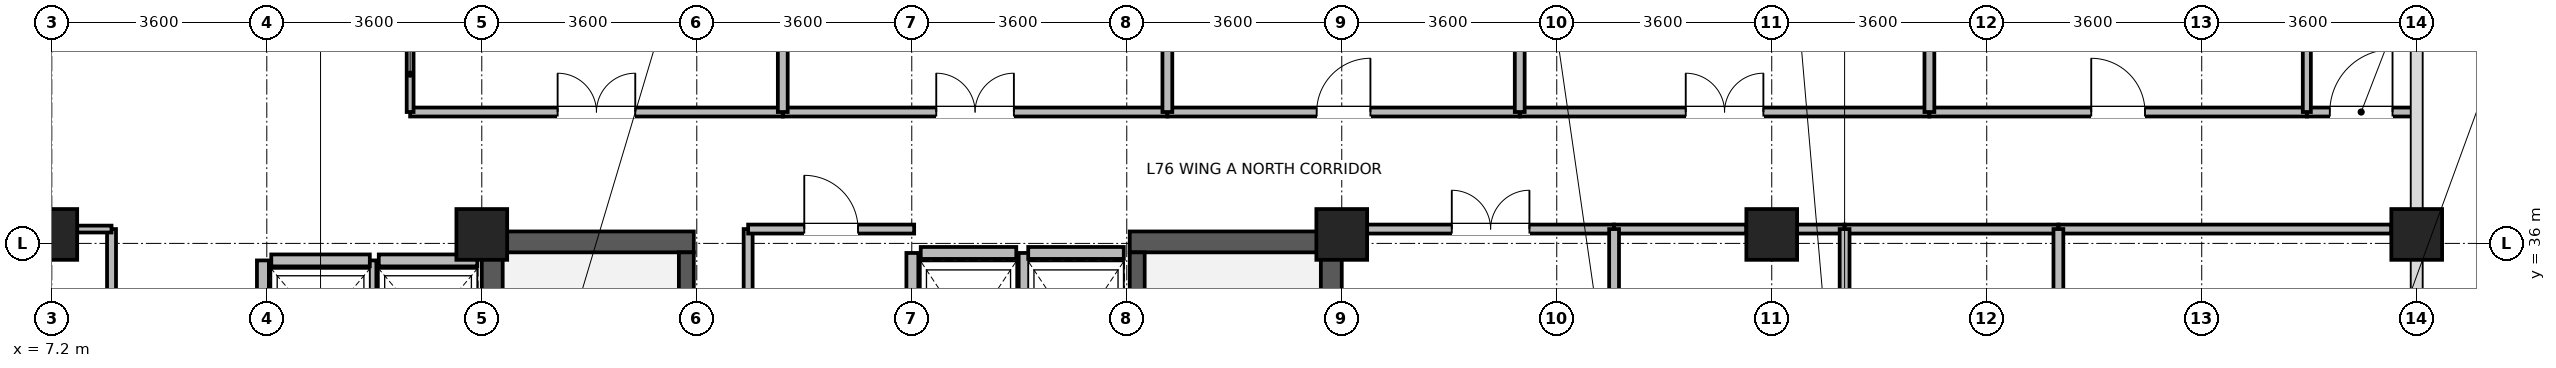
"""IFC4 building model, lengths in metres.
Left out: names, types, materials, properties, quantities, classifications, styles, units other than length and angle.
Written with IfcOpenShell. Run it as: python <this file> out.ifc"""

import sys

from ifc_helpers import new_model, si_unit, direction, frame, frame_2d, origin, origin_2d, place, context, subcontext, project, spatial, rectangle, extrude, source, transform, mapped, element, fill, save


model = new_model("IFC4")
c1 = context("Model", 3, precision=1e-05, world=origin(), true_north=direction((0.0, 1.0)))
c2 = subcontext(c1, "Body", "Model", "MODEL_VIEW")
j1 = project(units=[si_unit("LENGTHUNIT", "METRE"), si_unit("PLANEANGLEUNIT", "RADIAN")], contexts=[c1])
p1 = place(None, origin())
s1 = spatial("IfcSite", under=j1, at=p1, CompositionType="ELEMENT")
p2 = place(p1, origin())
s2 = spatial("IfcBuilding", under=s1, at=p2, CompositionType="ELEMENT")
p3 = place(p2, frame((0.0, 0.0, 294.3)))
s3 = spatial("IfcBuildingStorey", under=s2, at=p3, CompositionType="ELEMENT", Elevation=294.3)
for number, where, z_axis, x_axis in (
    (1, (14.575, 28.5, 0.0), (0.0, 0.0, 1.0), (0.0, 1.0, 0.0)),
    (2, (28.625, 28.5, 0.0), (0.0, 0.0, 1.0), (0.0, 1.0, 0.0)),
):
    element("IfcWall", number, at=place(p3, frame(where, z_axis=z_axis, x_axis=x_axis)), inside=s3, PredefinedType="SHEAR", context=c2, shape_type="SweptSolid", body=[
        extrude(rectangle(XDim=7.7, YDim=0.35, at=frame_2d((3.85, 0.0))), origin(), (0.0, 0.0, 1.0), 3.4),
    ])
for number, where, z_axis, x_axis in (
    (3, (14.75, 36.025, 0.0), (0.0, 0.0, 1.0), (1.0, 0.0, 0.0)),
    (4, (25.25, 36.025, 0.0), (0.0, 0.0, 1.0), (1.0, 0.0, 0.0)),
):
    element("IfcWall", number, at=place(p3, frame(where, z_axis=z_axis, x_axis=x_axis)), inside=s3, PredefinedType="SHEAR", context=c2, shape_type="SweptSolid", body=[
        extrude(rectangle(XDim=3.2, YDim=0.35, at=frame_2d((1.6, 0.0))), origin(), (0.0, 0.0, 1.0), 3.4),
    ])
p4 = place(p3, frame((17.825, 28.85, 0.0), z_axis=(0.0, 0.0, 1.0), x_axis=(0.0, 1.0, 0.0)))
e5 = element("IfcWall", 5, at=p4, inside=s3, PredefinedType="SHEAR", context=c2, shape_type="SweptSolid", body=[
    extrude(rectangle(XDim=7.0, YDim=0.25, at=frame_2d((3.5, 0.0))), origin(), (0.0, 0.0, 1.0), 3.4),
])
p5 = place(p4, frame((0.15, 0.0, 0.0)))
e6 = element("IfcOpeningElement", 6, at=p5, cuts=e5, PredefinedType="OPENING", context=c2, shape_type="SweptSolid", body=[
    extrude(rectangle(XDim=1.1, YDim=2.08, at=frame_2d((0.55, 1.04))), frame((0.0, 0.135, 0.0), z_axis=(0.0, -1.0, 0.0), x_axis=(1.0, 0.0, 0.0)), (0.0, 0.0, 1.0), 0.27),
])
p6 = place(p3, frame((25.375, 28.85, 0.0), z_axis=(0.0, 0.0, 1.0), x_axis=(0.0, 1.0, 0.0)))
e7 = element("IfcWall", 7, at=p6, inside=s3, PredefinedType="SHEAR", context=c2, shape_type="SweptSolid", body=[
    extrude(rectangle(XDim=7.0, YDim=0.25, at=frame_2d((3.5, 0.0))), origin(), (0.0, 0.0, 1.0), 3.4),
])
p7 = place(p6, frame((0.15, 0.0, 0.0)))
e8 = element("IfcOpeningElement", 8, at=p7, cuts=e7, PredefinedType="OPENING", context=c2, shape_type="SweptSolid", body=[
    extrude(rectangle(XDim=1.1, YDim=2.08, at=frame_2d((0.55, 1.04))), frame((0.0, 0.135, 0.0), z_axis=(0.0, -1.0, 0.0), x_axis=(1.0, 0.0, 0.0)), (0.0, 0.0, 1.0), 0.27),
])
m1 = source(origin(), c2, "Body", "SweptSolid", [
    extrude(rectangle(XDim=0.85, YDim=0.85, at=origin_2d()), origin(), (0.0, 0.0, 1.0), 3.7),
])
for number, where, z_axis, x_axis in (
    (9, (7.2, 36.15, 0.0), (0.0, 0.0, 1.0), (1.0, 0.0, 0.0)),
    (10, (14.4, 36.15, 0.0), (0.0, 0.0, 1.0), (1.0, 0.0, 0.0)),
    (11, (28.8, 36.15, 0.0), (0.0, 0.0, 1.0), (1.0, 0.0, 0.0)),
    (12, (36.0, 36.15, 0.0), (0.0, 0.0, 1.0), (1.0, 0.0, 0.0)),
    (13, (46.8, 36.15, 0.0), (0.0, 0.0, 1.0), (1.0, 0.0, 0.0)),
):
    element("IfcColumn", number, at=place(p3, frame(where, z_axis=z_axis, x_axis=x_axis)), inside=s3, PredefinedType="COLUMN", context=c2, shape_type="MappedRepresentation", body=[
        mapped(m1, transform((0.0, 0.0, 0.0), x_axis=(1.0, 0.0, 0.0), y_axis=(0.0, 1.0, 0.0), z_axis=(0.0, 0.0, 1.0), scale=1.0)),
    ])
p8 = place(p3, frame((12.675, 35.715, 0.0), z_axis=(0.0, 0.0, 1.0), x_axis=(1.0, 0.0, 0.0)))
e14 = element("IfcWall", 14, at=p8, inside=s3, PredefinedType="PARTITIONING", context=c2, shape_type="SweptSolid", body=[
    extrude(rectangle(XDim=1.65, YDim=0.2, at=frame_2d((0.825, 0.0))), origin(), (0.0, 0.0, 1.0), 3.38),
])
p9 = place(p3, frame((12.535, 33.485, 0.0), z_axis=(0.0, 0.0, 1.0), x_axis=(0.0, 1.0, 0.0)))
e15 = element("IfcWall", 15, at=p9, inside=s3, PredefinedType="PARTITIONING", context=c2, shape_type="SweptSolid", body=[
    extrude(rectangle(XDim=2.23, YDim=0.2, at=frame_2d((1.115, 0.0))), origin(), (0.0, 0.0, 1.0), 3.38),
])
p10 = place(p3, frame((10.875, 35.715, 0.0), z_axis=(0.0, 0.0, 1.0), x_axis=(1.0, 0.0, 0.0)))
e16 = element("IfcWall", 16, at=p10, inside=s3, PredefinedType="PARTITIONING", context=c2, shape_type="SweptSolid", body=[
    extrude(rectangle(XDim=1.65, YDim=0.2, at=frame_2d((0.825, 0.0))), origin(), (0.0, 0.0, 1.0), 3.38),
])
p11 = place(p3, frame((10.735, 33.485, 0.0), z_axis=(0.0, 0.0, 1.0), x_axis=(0.0, 1.0, 0.0)))
e17 = element("IfcWall", 17, at=p11, inside=s3, PredefinedType="PARTITIONING", context=c2, shape_type="SweptSolid", body=[
    extrude(rectangle(XDim=2.23, YDim=0.2, at=frame_2d((1.115, 0.0))), origin(), (0.0, 0.0, 1.0), 3.38),
])
p12 = place(p3, frame((21.75, 35.84, 0.0), z_axis=(0.0, 0.0, 1.0), x_axis=(1.0, 0.0, 0.0)))
e18 = element("IfcWall", 18, at=p12, inside=s3, PredefinedType="PARTITIONING", context=c2, shape_type="SweptSolid", body=[
    extrude(rectangle(XDim=1.6, YDim=0.2, at=frame_2d((0.8, 0.0))), origin(), (0.0, 0.0, 1.0), 2.48),
])
for number, where, z_axis, x_axis in (
    (19, (21.61, 33.16, 0.0), (0.0, 0.0, 1.0), (0.0, 1.0, 0.0)),
    (20, (23.49, 33.16, 0.0), (0.0, 0.0, 1.0), (0.0, 1.0, 0.0)),
):
    element("IfcWall", number, at=place(p3, frame(where, z_axis=z_axis, x_axis=x_axis)), inside=s3, PredefinedType="PARTITIONING", context=c2, shape_type="SweptSolid", body=[
        extrude(rectangle(XDim=2.68, YDim=0.2, at=frame_2d((1.34, 0.0))), origin(), (0.0, 0.0, 1.0), 3.38),
    ])
p13 = place(p3, frame((23.55, 35.84, 0.0), z_axis=(0.0, 0.0, 1.0), x_axis=(1.0, 0.0, 0.0)))
e21 = element("IfcWall", 21, at=p13, inside=s3, PredefinedType="PARTITIONING", context=c2, shape_type="SweptSolid", body=[
    extrude(rectangle(XDim=1.6, YDim=0.2, at=frame_2d((0.8, 0.0))), origin(), (0.0, 0.0, 1.0), 2.48),
])
p14 = place(p3, frame((31.78, 38.2, 0.0), z_axis=(0.0, 0.0, 1.0), x_axis=(1.0, 0.0, 0.0)))
e22 = element("IfcWall", 22, at=p14, inside=s3, PredefinedType="PARTITIONING", context=c2, shape_type="SweptSolid", body=[
    extrude(rectangle(XDim=6.86, YDim=0.15, at=frame_2d((3.43, 0.0))), origin(), (0.0, 0.0, 1.0), 3.38),
])
p15 = place(p14, frame((2.78, 0.0, 0.0)))
e23 = element("IfcOpeningElement", 23, at=p15, cuts=e22, PredefinedType="OPENING", context=c2, shape_type="SweptSolid", body=[
    extrude(rectangle(XDim=1.3, YDim=2.12, at=frame_2d((0.65, 1.06))), frame((0.0, 0.085, 0.0), z_axis=(0.0, -1.0, 0.0), x_axis=(1.0, 0.0, 0.0)), (0.0, 0.0, 1.0), 0.17),
])
p16 = place(p3, frame((19.44, 38.2, 0.0), z_axis=(0.0, 0.0, 1.0), x_axis=(1.0, 0.0, 0.0)))
e24 = element("IfcWall", 24, at=p16, inside=s3, PredefinedType="PARTITIONING", context=c2, shape_type="SweptSolid", body=[
    extrude(rectangle(XDim=6.44, YDim=0.15, at=frame_2d((3.22, 0.0))), origin(), (0.0, 0.0, 1.0), 3.38),
])
p17 = place(p16, frame((2.57, 0.0, 0.0)))
e25 = element("IfcOpeningElement", 25, at=p17, cuts=e24, PredefinedType="OPENING", context=c2, shape_type="SweptSolid", body=[
    extrude(rectangle(XDim=1.3, YDim=2.12, at=frame_2d((0.65, 1.06))), frame((0.0, 0.085, 0.0), z_axis=(0.0, -1.0, 0.0), x_axis=(1.0, 0.0, 0.0)), (0.0, 0.0, 1.0), 0.17),
])
p18 = place(p3, frame((38.64, 38.2, 0.0), z_axis=(0.0, 0.0, 1.0), x_axis=(1.0, 0.0, 0.0)))
e26 = element("IfcWall", 26, at=p18, inside=s3, PredefinedType="PARTITIONING", context=c2, shape_type="SweptSolid", body=[
    extrude(rectangle(XDim=6.32, YDim=0.15, at=frame_2d((3.16, 0.0))), origin(), (0.0, 0.0, 1.0), 3.38),
])
p19 = place(p18, frame((2.71, 0.0, 0.0)))
e27 = element("IfcOpeningElement", 27, at=p19, cuts=e26, PredefinedType="OPENING", context=c2, shape_type="SweptSolid", body=[
    extrude(rectangle(XDim=0.9, YDim=2.08, at=frame_2d((0.45, 1.04))), frame((0.0, 0.085, 0.0), z_axis=(0.0, -1.0, 0.0), x_axis=(1.0, 0.0, 0.0)), (0.0, 0.0, 1.0), 0.17),
])
p20 = place(p3, frame((13.2, 38.2, 0.0), z_axis=(0.0, 0.0, 1.0), x_axis=(1.0, 0.0, 0.0)))
e28 = element("IfcWall", 28, at=p20, inside=s3, PredefinedType="PARTITIONING", context=c2, shape_type="SweptSolid", body=[
    extrude(rectangle(XDim=6.24, YDim=0.15, at=frame_2d((3.12, 0.0))), origin(), (0.0, 0.0, 1.0), 3.38),
])
p21 = place(p20, frame((2.47, 0.0, 0.0)))
e29 = element("IfcOpeningElement", 29, at=p21, cuts=e28, PredefinedType="OPENING", context=c2, shape_type="SweptSolid", body=[
    extrude(rectangle(XDim=1.3, YDim=2.12, at=frame_2d((0.65, 1.06))), frame((0.0, 0.085, 0.0), z_axis=(0.0, -1.0, 0.0), x_axis=(1.0, 0.0, 0.0)), (0.0, 0.0, 1.0), 0.17),
])
p22 = place(p3, frame((40.8, 36.24, 0.0), z_axis=(0.0, 0.0, 1.0), x_axis=(1.0, 0.0, 0.0)))
e30 = element("IfcWall", 30, at=p22, inside=s3, PredefinedType="PARTITIONING", context=c2, shape_type="SweptSolid", body=[
    extrude(rectangle(XDim=5.575, YDim=0.15, at=frame_2d((2.788, 0.0))), origin(), (0.0, 0.0, 1.0), 2.83),
])
p23 = place(p3, frame((25.88, 38.2, 0.0), z_axis=(0.0, 0.0, 1.0), x_axis=(1.0, 0.0, 0.0)))
e31 = element("IfcWall", 31, at=p23, inside=s3, PredefinedType="PARTITIONING", context=c2, shape_type="SweptSolid", body=[
    extrude(rectangle(XDim=5.9, YDim=0.15, at=frame_2d((2.95, 0.0))), origin(), (0.0, 0.0, 1.0), 3.38),
])
p24 = place(p23, frame((2.5, 0.0, 0.0)))
e32 = element("IfcOpeningElement", 32, at=p24, cuts=e31, PredefinedType="OPENING", context=c2, shape_type="SweptSolid", body=[
    extrude(rectangle(XDim=0.9, YDim=2.08, at=frame_2d((0.45, 1.04))), frame((0.0, 0.085, 0.0), z_axis=(0.0, -1.0, 0.0), x_axis=(1.0, 0.0, 0.0)), (0.0, 0.0, 1.0), 0.17),
])
p25 = place(p3, frame((29.225, 36.24, 0.0), z_axis=(0.0, 0.0, 1.0), x_axis=(1.0, 0.0, 0.0)))
e33 = element("IfcWall", 33, at=p25, inside=s3, PredefinedType="PARTITIONING", context=c2, shape_type="SweptSolid", body=[
    extrude(rectangle(XDim=4.135, YDim=0.15, at=frame_2d((2.067, 0.0))), origin(), (0.0, 0.0, 1.0), 2.83),
])
p26 = place(p25, frame((1.417, 0.0, 0.0)))
e34 = element("IfcOpeningElement", 34, at=p26, cuts=e33, PredefinedType="OPENING", context=c2, shape_type="SweptSolid", body=[
    extrude(rectangle(XDim=1.3, YDim=2.12, at=frame_2d((0.65, 1.06))), frame((0.0, 0.085, 0.0), z_axis=(0.0, -1.0, 0.0), x_axis=(1.0, 0.0, 0.0)), (0.0, 0.0, 1.0), 0.17),
])
p27 = place(p3, frame((33.36, 36.24, 0.0), z_axis=(0.0, 0.0, 1.0), x_axis=(1.0, 0.0, 0.0)))
e35 = element("IfcWall", 35, at=p27, inside=s3, PredefinedType="PARTITIONING", context=c2, shape_type="SweptSolid", body=[
    extrude(rectangle(XDim=2.215, YDim=0.15, at=frame_2d((1.107, 0.0))), origin(), (0.0, 0.0, 1.0), 2.83),
])
p28 = place(p3, frame((36.425, 36.24, 0.0), z_axis=(0.0, 0.0, 1.0), x_axis=(1.0, 0.0, 0.0)))
e36 = element("IfcWall", 36, at=p28, inside=s3, PredefinedType="PARTITIONING", context=c2, shape_type="SweptSolid", body=[
    extrude(rectangle(XDim=0.795, YDim=0.15, at=frame_2d((0.397, 0.0))), origin(), (0.0, 0.0, 1.0), 2.83),
])
p29 = place(p3, frame((8.2, 32.4, 0.0), z_axis=(0.0, 0.0, 1.0), x_axis=(0.0, 1.0, 0.0)))
e37 = element("IfcWall", 37, at=p29, inside=s3, PredefinedType="PARTITIONING", context=c2, shape_type="SweptSolid", body=[
    extrude(rectangle(XDim=3.84, YDim=0.15, at=frame_2d((1.92, 0.0))), origin(), (0.0, 0.0, 1.0), 3.38),
])
p30 = place(p29, frame((1.27, 0.0, 0.0)))
e38 = element("IfcOpeningElement", 38, at=p30, cuts=e37, PredefinedType="OPENING", context=c2, shape_type="SweptSolid", body=[
    extrude(rectangle(XDim=1.3, YDim=2.12, at=frame_2d((0.65, 1.06))), frame((0.0, 0.085, 0.0), z_axis=(0.0, -1.0, 0.0), x_axis=(1.0, 0.0, 0.0)), (0.0, 0.0, 1.0), 0.17),
])
p31 = place(p3, frame((37.22, 36.24, 0.0), z_axis=(0.0, 0.0, 1.0), x_axis=(1.0, 0.0, 0.0)))
e39 = element("IfcWall", 39, at=p31, inside=s3, PredefinedType="PARTITIONING", context=c2, shape_type="SweptSolid", body=[
    extrude(rectangle(XDim=3.58, YDim=0.15, at=frame_2d((1.79, 0.0))), origin(), (0.0, 0.0, 1.0), 2.83),
])
p32 = place(p3, frame((18.86, 33.36, 0.0), z_axis=(0.0, 0.0, 1.0), x_axis=(0.0, 1.0, 0.0)))
e40 = element("IfcWall", 40, at=p32, inside=s3, PredefinedType="PARTITIONING", context=c2, shape_type="SweptSolid", body=[
    extrude(rectangle(XDim=2.88, YDim=0.15, at=frame_2d((1.44, 0.0))), origin(), (0.0, 0.0, 1.0), 3.38),
])
p33 = place(p3, frame((18.86, 36.24, 0.0), z_axis=(0.0, 0.0, 1.0), x_axis=(1.0, 0.0, 0.0)))
e41 = element("IfcWall", 41, at=p33, inside=s3, PredefinedType="PARTITIONING", context=c2, shape_type="SweptSolid", body=[
    extrude(rectangle(XDim=2.78, YDim=0.15, at=frame_2d((1.39, 0.0))), origin(), (0.0, 0.0, 1.0), 2.48),
])
p34 = place(p33, frame((0.94, 0.0, 0.0)))
e42 = element("IfcOpeningElement", 42, at=p34, cuts=e41, PredefinedType="OPENING", context=c2, shape_type="SweptSolid", body=[
    extrude(rectangle(XDim=0.9, YDim=2.08, at=frame_2d((0.45, 1.04))), frame((0.0, 0.085, 0.0), z_axis=(0.0, -1.0, 0.0), x_axis=(1.0, 0.0, 0.0)), (0.0, 0.0, 1.0), 0.17),
])
p35 = place(p3, frame((44.96, 38.2, 0.0), z_axis=(0.0, 0.0, 1.0), x_axis=(1.0, 0.0, 0.0)))
e43 = element("IfcWall", 43, at=p35, inside=s3, PredefinedType="PARTITIONING", context=c2, shape_type="SweptSolid", body=[
    extrude(rectangle(XDim=1.82, YDim=0.15, at=frame_2d((0.91, 0.0))), origin(), (0.0, 0.0, 1.0), 3.38),
])
p36 = place(p35, frame((0.385, 0.0, 0.0)))
e44 = element("IfcOpeningElement", 44, at=p36, cuts=e43, PredefinedType="OPENING", context=c2, shape_type="SweptSolid", body=[
    extrude(rectangle(XDim=1.05, YDim=2.12, at=frame_2d((0.525, 1.06))), frame((0.0, 0.085, 0.0), z_axis=(0.0, -1.0, 0.0), x_axis=(1.0, 0.0, 0.0)), (0.0, 0.0, 1.0), 0.17),
])
for number, where, z_axis, x_axis in (
    (45, (37.22, 28.56, 0.0), (0.0, 0.0, 1.0), (0.0, 1.0, 0.0)),
    (46, (40.8, 28.56, 0.0), (0.0, 0.0, 1.0), (0.0, 1.0, 0.0)),
):
    element("IfcWall", number, at=place(p3, frame(where, z_axis=z_axis, x_axis=x_axis)), inside=s3, PredefinedType="PARTITIONING", context=c2, shape_type="SweptSolid", body=[
        extrude(rectangle(XDim=7.68, YDim=0.165, at=frame_2d((3.84, 0.0))), origin(), (0.0, 0.0, 1.0), 3.38),
    ])
p37 = place(p3, frame((13.2, 38.2, 0.0), z_axis=(0.0, 0.0, 1.0), x_axis=(0.0, 1.0, 0.0)))
e47 = element("IfcWall", 47, at=p37, inside=s3, PredefinedType="PARTITIONING", context=c2, shape_type="SweptSolid", body=[
    extrude(rectangle(XDim=1.268, YDim=0.115, at=frame_2d((0.634, 0.0))), origin(), (0.0, 0.0, 1.0), 3.38),
])
for number, where, z_axis, x_axis in (
    (48, (19.44, 38.2, 0.0), (0.0, 0.0, 1.0), (0.0, 1.0, 0.0)),
    (49, (25.88, 38.2, 0.0), (0.0, 0.0, 1.0), (0.0, 1.0, 0.0)),
    (50, (31.78, 38.2, 0.0), (0.0, 0.0, 1.0), (0.0, 1.0, 0.0)),
    (51, (38.64, 38.2, 0.0), (0.0, 0.0, 1.0), (0.0, 1.0, 0.0)),
):
    element("IfcWall", number, at=place(p3, frame(where, z_axis=z_axis, x_axis=x_axis)), inside=s3, PredefinedType="PARTITIONING", context=c2, shape_type="SweptSolid", body=[
        extrude(rectangle(XDim=4.868, YDim=0.165, at=frame_2d((2.434, 0.0))), origin(), (0.0, 0.0, 1.0), 3.38),
    ])
p38 = place(p3, frame((44.96, 38.2, 0.0), z_axis=(0.0, 0.0, 1.0), x_axis=(0.0, 1.0, 0.0)))
e52 = element("IfcWall", 52, at=p38, inside=s3, PredefinedType="PARTITIONING", context=c2, shape_type="SweptSolid", body=[
    extrude(rectangle(XDim=4.868, YDim=0.135, at=frame_2d((2.434, 0.0))), origin(), (0.0, 0.0, 1.0), 3.38),
])
p39 = place(p3, frame((33.36, 31.64, 0.0), z_axis=(0.0, 0.0, 1.0), x_axis=(0.0, 1.0, 0.0)))
e53 = element("IfcWall", 53, at=p39, inside=s3, PredefinedType="PARTITIONING", context=c2, shape_type="SweptSolid", body=[
    extrude(rectangle(XDim=4.6, YDim=0.165, at=frame_2d((2.3, 0.0))), origin(), (0.0, 0.0, 1.0), 3.38),
])
p40 = place(p3, frame((7.625, 36.24, 0.0), z_axis=(0.0, 0.0, 1.0), x_axis=(1.0, 0.0, 0.0)))
e54 = element("IfcWall", 54, at=p40, inside=s3, PredefinedType="PARTITIONING", context=c2, shape_type="SweptSolid", body=[
    extrude(rectangle(XDim=0.575, YDim=0.115, at=frame_2d((0.288, 0.0))), origin(), (0.0, 0.0, 1.0), 2.83),
])
p41 = place(p15, origin())
e55 = element("IfcDoor", 55, at=p41, inside=s3, OperationType="DOUBLE_DOOR_SINGLE_SWING", PredefinedType="DOOR", context=c2, shape_type="SweptSolid", body=[
    extrude(rectangle(XDim=1.3, YDim=2.12, at=frame_2d((0.65, 1.06))), frame((0.0, 0.025, 0.0), z_axis=(0.0, -1.0, 0.0), x_axis=(1.0, 0.0, 0.0)), (0.0, 0.0, 1.0), 0.05),
])
fill(e23, e55)
p42 = place(p17, origin())
e56 = element("IfcDoor", 56, at=p42, inside=s3, OperationType="DOUBLE_DOOR_SINGLE_SWING", PredefinedType="DOOR", context=c2, shape_type="SweptSolid", body=[
    extrude(rectangle(XDim=1.3, YDim=2.12, at=frame_2d((0.65, 1.06))), frame((0.0, 0.025, 0.0), z_axis=(0.0, -1.0, 0.0), x_axis=(1.0, 0.0, 0.0)), (0.0, 0.0, 1.0), 0.05),
])
fill(e25, e56)
p43 = place(p19, origin())
e57 = element("IfcDoor", 57, at=p43, inside=s3, OperationType="SINGLE_SWING_LEFT", PredefinedType="DOOR", context=c2, shape_type="SweptSolid", body=[
    extrude(rectangle(XDim=0.9, YDim=2.08, at=frame_2d((0.45, 1.04))), frame((0.0, 0.025, 0.0), z_axis=(0.0, -1.0, 0.0), x_axis=(1.0, 0.0, 0.0)), (0.0, 0.0, 1.0), 0.05),
])
fill(e27, e57)
p44 = place(p21, origin())
e58 = element("IfcDoor", 58, at=p44, inside=s3, OperationType="DOUBLE_DOOR_SINGLE_SWING", PredefinedType="DOOR", context=c2, shape_type="SweptSolid", body=[
    extrude(rectangle(XDim=1.3, YDim=2.12, at=frame_2d((0.65, 1.06))), frame((0.0, 0.025, 0.0), z_axis=(0.0, -1.0, 0.0), x_axis=(1.0, 0.0, 0.0)), (0.0, 0.0, 1.0), 0.05),
])
fill(e29, e58)
p45 = place(p24, origin())
e59 = element("IfcDoor", 59, at=p45, inside=s3, OperationType="SINGLE_SWING_RIGHT", PredefinedType="DOOR", context=c2, shape_type="SweptSolid", body=[
    extrude(rectangle(XDim=0.9, YDim=2.08, at=frame_2d((0.45, 1.04))), frame((0.0, 0.025, 0.0), z_axis=(0.0, -1.0, 0.0), x_axis=(1.0, 0.0, 0.0)), (0.0, 0.0, 1.0), 0.05),
])
fill(e32, e59)
p46 = place(p26, origin())
e60 = element("IfcDoor", 60, at=p46, inside=s3, OperationType="DOUBLE_DOOR_SINGLE_SWING", PredefinedType="DOOR", context=c2, shape_type="SweptSolid", body=[
    extrude(rectangle(XDim=1.3, YDim=2.12, at=frame_2d((0.65, 1.06))), frame((0.0, 0.025, 0.0), z_axis=(0.0, -1.0, 0.0), x_axis=(1.0, 0.0, 0.0)), (0.0, 0.0, 1.0), 0.05),
])
fill(e34, e60)
p47 = place(p34, origin())
e61 = element("IfcDoor", 61, at=p47, inside=s3, OperationType="SINGLE_SWING_LEFT", PredefinedType="DOOR", context=c2, shape_type="SweptSolid", body=[
    extrude(rectangle(XDim=0.9, YDim=2.08, at=frame_2d((0.45, 1.04))), frame((0.0, 0.025, 0.0), z_axis=(0.0, -1.0, 0.0), x_axis=(1.0, 0.0, 0.0)), (0.0, 0.0, 1.0), 0.05),
])
fill(e42, e61)
p48 = place(p36, origin())
e62 = element("IfcDoor", 62, at=p48, inside=s3, OperationType="SINGLE_SWING_RIGHT", PredefinedType="DOOR", context=c2, shape_type="SweptSolid", body=[
    extrude(rectangle(XDim=1.05, YDim=2.12, at=frame_2d((0.525, 1.06))), frame((0.0, 0.025, 0.0), z_axis=(0.0, -1.0, 0.0), x_axis=(1.0, 0.0, 0.0)), (0.0, 0.0, 1.0), 0.05),
])
fill(e44, e62)
save(model, sys.argv[1])
